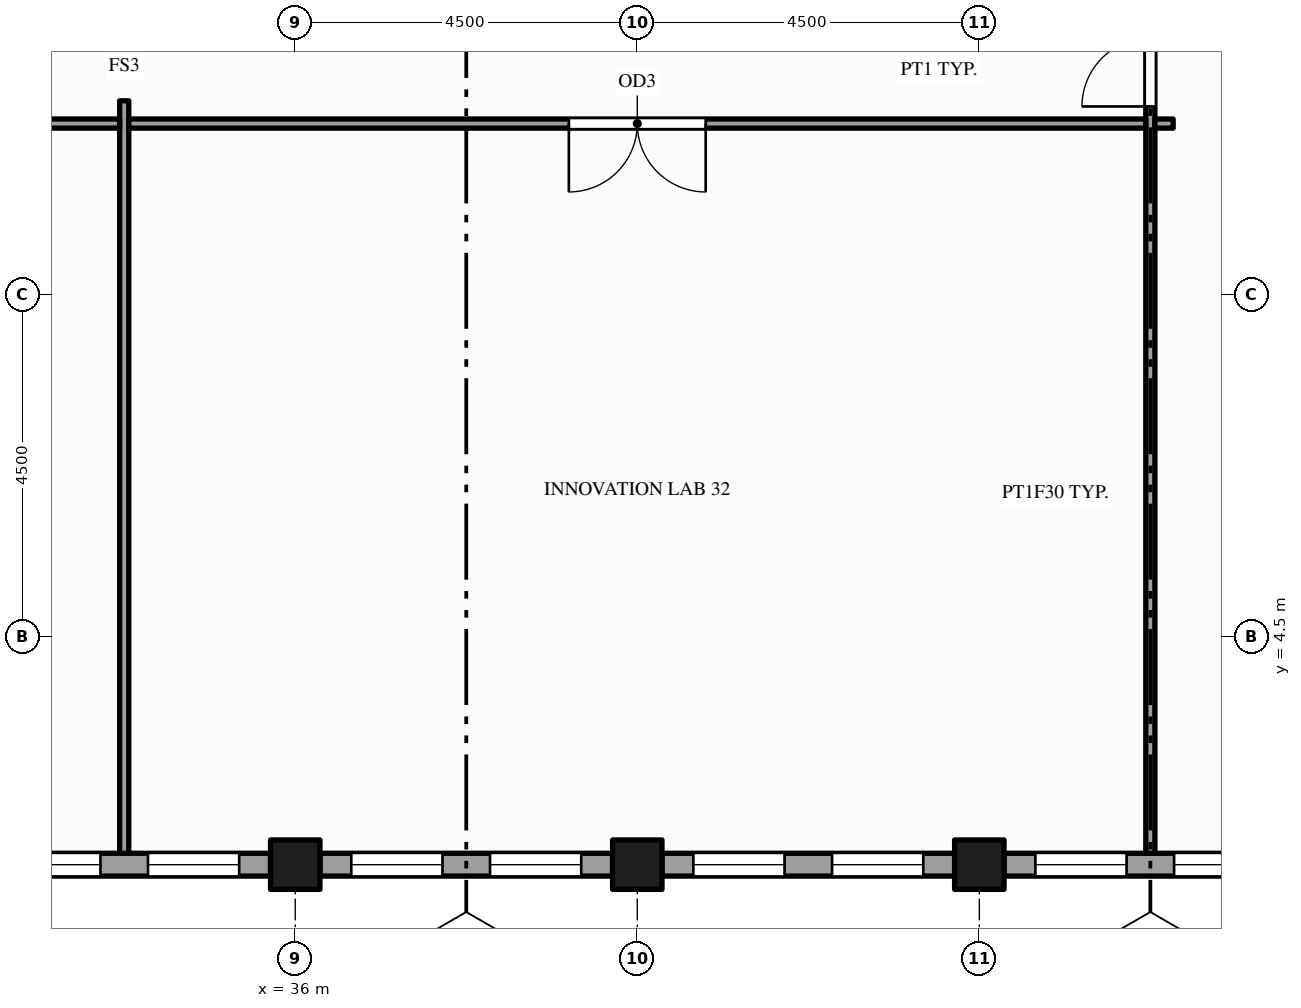
"""IFC4 building model, lengths in metres.
Left out: names, types, materials, properties, quantities, classifications, styles, units other than length and angle.
Written with IfcOpenShell. Run it as: python <this file> out.ifc"""

import sys

from ifc_helpers import new_model, si_unit, direction, frame, frame_2d, origin, origin_2d, place, context, subcontext, project, spatial, rectangle, hollow_rectangle, extrude, element, fill, save


model = new_model("IFC4")
c1 = context("Model", 3, precision=1e-05, world=origin(), true_north=direction((0.0, 1.0)))
c2 = subcontext(c1, "Body", "Model", "MODEL_VIEW")
j1 = project(units=[si_unit("LENGTHUNIT", "METRE"), si_unit("PLANEANGLEUNIT", "RADIAN")], contexts=[c1])
p1 = place(None, origin())
s1 = spatial("IfcSite", under=j1, at=p1, CompositionType="ELEMENT")
p2 = place(p1, origin())
s2 = spatial("IfcBuilding", under=s1, at=p2, CompositionType="ELEMENT")
p3 = place(p2, frame((0.0, 0.0, 261.0)))
s3 = spatial("IfcBuildingStorey", under=s2, at=p3, CompositionType="ELEMENT", Elevation=261.0)
for number, where, z_axis, x_axis in (
    (1, (36.0, 1.5, -0.15), (0.0, 0.0, 1.0), (1.0, 0.0, 0.0)),
    (2, (40.5, 1.5, -0.15), (0.0, 0.0, 1.0), (1.0, 0.0, 0.0)),
    (3, (45.0, 1.5, -0.15), (0.0, 0.0, 1.0), (1.0, 0.0, 0.0)),
):
    element("IfcColumn", number, at=place(p3, frame(where, z_axis=z_axis, x_axis=x_axis)), inside=s3, PredefinedType="COLUMN", context=c2, shape_type="SweptSolid", body=[
        extrude(hollow_rectangle(XDim=0.65, YDim=0.65, WallThickness=0.032, at=origin_2d()), origin(), (0.0, 0.0, 1.0), 4.0),
    ])
p4 = place(p3, frame((31.825, 1.5, 0.0), z_axis=(0.0, 0.0, 1.0), x_axis=(1.0, 0.0, 0.0)))
e4 = element("IfcWall", 4, at=p4, inside=s3, PredefinedType="STANDARD", context=c2, shape_type="SweptSolid", body=[
    extrude(rectangle(XDim=3.85, YDim=0.3, at=frame_2d((1.925, 0.0))), origin(), (0.0, 0.0, 1.0), 2.87),
])
p5 = place(p4, frame((0.413, 0.0, 0.9)))
e5 = element("IfcOpeningElement", 5, at=p5, cuts=e4, PredefinedType="OPENING", context=c2, shape_type="SweptSolid", body=[
    extrude(rectangle(XDim=1.2, YDim=1.75, at=frame_2d((0.6, 0.875))), frame((0.0, 0.16, 0.0), z_axis=(0.0, -1.0, 0.0), x_axis=(1.0, 0.0, 0.0)), (0.0, 0.0, 1.0), 0.32),
])
p6 = place(p4, frame((2.238, 0.0, 0.9)))
e6 = element("IfcOpeningElement", 6, at=p6, cuts=e4, PredefinedType="OPENING", context=c2, shape_type="SweptSolid", body=[
    extrude(rectangle(XDim=1.2, YDim=1.75, at=frame_2d((0.6, 0.875))), frame((0.0, 0.16, 0.0), z_axis=(0.0, -1.0, 0.0), x_axis=(1.0, 0.0, 0.0)), (0.0, 0.0, 1.0), 0.32),
])
p7 = place(p3, frame((36.325, 1.5, 0.0), z_axis=(0.0, 0.0, 1.0), x_axis=(1.0, 0.0, 0.0)))
e7 = element("IfcWall", 7, at=p7, inside=s3, PredefinedType="STANDARD", context=c2, shape_type="SweptSolid", body=[
    extrude(rectangle(XDim=3.85, YDim=0.3, at=frame_2d((1.925, 0.0))), origin(), (0.0, 0.0, 1.0), 2.87),
])
p8 = place(p7, frame((0.413, 0.0, 0.9)))
e8 = element("IfcOpeningElement", 8, at=p8, cuts=e7, PredefinedType="OPENING", context=c2, shape_type="SweptSolid", body=[
    extrude(rectangle(XDim=1.2, YDim=1.75, at=frame_2d((0.6, 0.875))), frame((0.0, 0.16, 0.0), z_axis=(0.0, -1.0, 0.0), x_axis=(1.0, 0.0, 0.0)), (0.0, 0.0, 1.0), 0.32),
])
p9 = place(p7, frame((2.238, 0.0, 0.9)))
e9 = element("IfcOpeningElement", 9, at=p9, cuts=e7, PredefinedType="OPENING", context=c2, shape_type="SweptSolid", body=[
    extrude(rectangle(XDim=1.2, YDim=1.75, at=frame_2d((0.6, 0.875))), frame((0.0, 0.16, 0.0), z_axis=(0.0, -1.0, 0.0), x_axis=(1.0, 0.0, 0.0)), (0.0, 0.0, 1.0), 0.32),
])
p10 = place(p3, frame((40.825, 1.5, 0.0), z_axis=(0.0, 0.0, 1.0), x_axis=(1.0, 0.0, 0.0)))
e10 = element("IfcWall", 10, at=p10, inside=s3, PredefinedType="STANDARD", context=c2, shape_type="SweptSolid", body=[
    extrude(rectangle(XDim=3.85, YDim=0.3, at=frame_2d((1.925, 0.0))), origin(), (0.0, 0.0, 1.0), 2.87),
])
p11 = place(p10, frame((0.413, 0.0, 0.9)))
e11 = element("IfcOpeningElement", 11, at=p11, cuts=e10, PredefinedType="OPENING", context=c2, shape_type="SweptSolid", body=[
    extrude(rectangle(XDim=1.2, YDim=1.75, at=frame_2d((0.6, 0.875))), frame((0.0, 0.16, 0.0), z_axis=(0.0, -1.0, 0.0), x_axis=(1.0, 0.0, 0.0)), (0.0, 0.0, 1.0), 0.32),
])
p12 = place(p10, frame((2.238, 0.0, 0.9)))
e12 = element("IfcOpeningElement", 12, at=p12, cuts=e10, PredefinedType="OPENING", context=c2, shape_type="SweptSolid", body=[
    extrude(rectangle(XDim=1.2, YDim=1.75, at=frame_2d((0.6, 0.875))), frame((0.0, 0.16, 0.0), z_axis=(0.0, -1.0, 0.0), x_axis=(1.0, 0.0, 0.0)), (0.0, 0.0, 1.0), 0.32),
])
p13 = place(p3, frame((45.325, 1.5, 0.0), z_axis=(0.0, 0.0, 1.0), x_axis=(1.0, 0.0, 0.0)))
e13 = element("IfcWall", 13, at=p13, inside=s3, PredefinedType="STANDARD", context=c2, shape_type="SweptSolid", body=[
    extrude(rectangle(XDim=3.85, YDim=0.3, at=frame_2d((1.925, 0.0))), origin(), (0.0, 0.0, 1.0), 2.87),
])
p14 = place(p13, frame((0.413, 0.0, 0.9)))
e14 = element("IfcOpeningElement", 14, at=p14, cuts=e13, PredefinedType="OPENING", context=c2, shape_type="SweptSolid", body=[
    extrude(rectangle(XDim=1.2, YDim=1.75, at=frame_2d((0.6, 0.875))), frame((0.0, 0.16, 0.0), z_axis=(0.0, -1.0, 0.0), x_axis=(1.0, 0.0, 0.0)), (0.0, 0.0, 1.0), 0.32),
])
p15 = place(p13, frame((2.238, 0.0, 0.9)))
e15 = element("IfcOpeningElement", 15, at=p15, cuts=e13, PredefinedType="OPENING", context=c2, shape_type="SweptSolid", body=[
    extrude(rectangle(XDim=1.2, YDim=1.75, at=frame_2d((0.6, 0.875))), frame((0.0, 0.16, 0.0), z_axis=(0.0, -1.0, 0.0), x_axis=(1.0, 0.0, 0.0)), (0.0, 0.0, 1.0), 0.32),
])
p16 = place(p3, frame((33.75, 1.65, 0.0), z_axis=(0.0, 0.0, 1.0), x_axis=(0.0, 1.0, 0.0)))
e16 = element("IfcWall", 16, at=p16, inside=s3, PredefinedType="PARTITIONING", context=c2, shape_type="SweptSolid", body=[
    extrude(rectangle(XDim=9.9, YDim=0.12, at=frame_2d((4.95, 0.0))), origin(), (0.0, 0.0, 1.0), 2.87),
])
p17 = place(p3, frame((47.25, 1.65, 0.0), z_axis=(0.0, 0.0, 1.0), x_axis=(0.0, 1.0, 0.0)))
e17 = element("IfcWall", 17, at=p17, inside=s3, PredefinedType="PARTITIONING", context=c2, shape_type="SweptSolid", body=[
    extrude(rectangle(XDim=22.2, YDim=0.12, at=frame_2d((11.1, 0.0))), origin(), (0.0, 0.0, 1.0), 2.87),
])
p18 = place(p17, frame((9.825, 0.0, 0.0)))
e18 = element("IfcOpeningElement", 18, at=p18, cuts=e17, PredefinedType="OPENING", context=c2, shape_type="SweptSolid", body=[
    extrude(rectangle(XDim=1.8, YDim=2.1, at=frame_2d((0.9, 1.05))), frame((0.0, 0.07, 0.0), z_axis=(0.0, -1.0, 0.0), x_axis=(1.0, 0.0, 0.0)), (0.0, 0.0, 1.0), 0.14),
])
p19 = place(p17, frame((12.85, 0.0, 0.0)))
e19 = element("IfcOpeningElement", 19, at=p19, cuts=e17, PredefinedType="OPENING", context=c2, shape_type="SweptSolid", body=[
    extrude(rectangle(XDim=0.9, YDim=2.1, at=frame_2d((0.45, 1.05))), frame((0.0, 0.07, 0.0), z_axis=(0.0, -1.0, 0.0), x_axis=(1.0, 0.0, 0.0)), (0.0, 0.0, 1.0), 0.14),
])
p20 = place(p17, frame((16.65, 0.0, 0.0)))
e20 = element("IfcOpeningElement", 20, at=p20, cuts=e17, PredefinedType="OPENING", context=c2, shape_type="SweptSolid", body=[
    extrude(rectangle(XDim=0.9, YDim=2.1, at=frame_2d((0.45, 1.05))), frame((0.0, 0.07, 0.0), z_axis=(0.0, -1.0, 0.0), x_axis=(1.0, 0.0, 0.0)), (0.0, 0.0, 1.0), 0.14),
])
p21 = place(p17, frame((20.35, 0.0, 0.0)))
e21 = element("IfcOpeningElement", 21, at=p21, cuts=e17, PredefinedType="OPENING", context=c2, shape_type="SweptSolid", body=[
    extrude(rectangle(XDim=1.0, YDim=2.1, at=frame_2d((0.5, 1.05))), frame((0.0, 0.07, 0.0), z_axis=(0.0, -1.0, 0.0), x_axis=(1.0, 0.0, 0.0)), (0.0, 0.0, 1.0), 0.14),
])
p22 = place(p3, frame((29.31, 11.25, 0.0), z_axis=(0.0, 0.0, 1.0), x_axis=(1.0, 0.0, 0.0)))
e22 = element("IfcWall", 22, at=p22, inside=s3, PredefinedType="PARTITIONING", context=c2, shape_type="SweptSolid", body=[
    extrude(rectangle(XDim=4.38, YDim=0.12, at=frame_2d((2.19, 0.0))), origin(), (0.0, 0.0, 1.0), 2.87),
])
p23 = place(p22, frame((1.69, 0.0, 0.0)))
e23 = element("IfcOpeningElement", 23, at=p23, cuts=e22, PredefinedType="OPENING", context=c2, shape_type="SweptSolid", body=[
    extrude(rectangle(XDim=1.0, YDim=2.1, at=frame_2d((0.5, 1.05))), frame((0.0, 0.07, 0.0), z_axis=(0.0, -1.0, 0.0), x_axis=(1.0, 0.0, 0.0)), (0.0, 0.0, 1.0), 0.14),
])
p24 = place(p3, frame((33.81, 11.25, 0.0), z_axis=(0.0, 0.0, 1.0), x_axis=(1.0, 0.0, 0.0)))
e24 = element("IfcWall", 24, at=p24, inside=s3, PredefinedType="PARTITIONING", context=c2, shape_type="SweptSolid", body=[
    extrude(rectangle(XDim=13.38, YDim=0.12, at=frame_2d((6.69, 0.0))), origin(), (0.0, 0.0, 1.0), 2.87),
])
p25 = place(p24, frame((5.79, 0.0, 0.0)))
e25 = element("IfcOpeningElement", 25, at=p25, cuts=e24, PredefinedType="OPENING", context=c2, shape_type="SweptSolid", body=[
    extrude(rectangle(XDim=1.8, YDim=2.1, at=frame_2d((0.9, 1.05))), frame((0.0, 0.07, 0.0), z_axis=(0.0, -1.0, 0.0), x_axis=(1.0, 0.0, 0.0)), (0.0, 0.0, 1.0), 0.14),
])
p26 = place(p3, frame((47.31, 11.25, 0.0), z_axis=(0.0, 0.0, 1.0), x_axis=(1.0, 0.0, 0.0)))
e26 = element("IfcWall", 26, at=p26, inside=s3, PredefinedType="PARTITIONING", context=c2, shape_type="SweptSolid", body=[
    extrude(rectangle(XDim=0.24, YDim=0.12, at=frame_2d((0.12, 0.0))), origin(), (0.0, 0.0, 1.0), 2.87),
])
p27 = place(p5, origin())
e27 = element("IfcWindow", 27, at=p27, inside=s3, PartitioningType="SINGLE_PANEL", PredefinedType="WINDOW", context=c2, shape_type="SweptSolid", body=[
    extrude(rectangle(XDim=1.2, YDim=1.75, at=frame_2d((0.6, 0.875))), frame((0.0, 0.03, 0.0), z_axis=(0.0, -1.0, 0.0), x_axis=(1.0, 0.0, 0.0)), (0.0, 0.0, 1.0), 0.06),
])
fill(e5, e27)
p28 = place(p6, origin())
e28 = element("IfcWindow", 28, at=p28, inside=s3, PartitioningType="SINGLE_PANEL", PredefinedType="WINDOW", context=c2, shape_type="SweptSolid", body=[
    extrude(rectangle(XDim=1.2, YDim=1.75, at=frame_2d((0.6, 0.875))), frame((0.0, 0.03, 0.0), z_axis=(0.0, -1.0, 0.0), x_axis=(1.0, 0.0, 0.0)), (0.0, 0.0, 1.0), 0.06),
])
fill(e6, e28)
p29 = place(p8, origin())
e29 = element("IfcWindow", 29, at=p29, inside=s3, PartitioningType="SINGLE_PANEL", PredefinedType="WINDOW", context=c2, shape_type="SweptSolid", body=[
    extrude(rectangle(XDim=1.2, YDim=1.75, at=frame_2d((0.6, 0.875))), frame((0.0, 0.03, 0.0), z_axis=(0.0, -1.0, 0.0), x_axis=(1.0, 0.0, 0.0)), (0.0, 0.0, 1.0), 0.06),
])
fill(e8, e29)
p30 = place(p9, origin())
e30 = element("IfcWindow", 30, at=p30, inside=s3, PartitioningType="SINGLE_PANEL", PredefinedType="WINDOW", context=c2, shape_type="SweptSolid", body=[
    extrude(rectangle(XDim=1.2, YDim=1.75, at=frame_2d((0.6, 0.875))), frame((0.0, 0.03, 0.0), z_axis=(0.0, -1.0, 0.0), x_axis=(1.0, 0.0, 0.0)), (0.0, 0.0, 1.0), 0.06),
])
fill(e9, e30)
p31 = place(p11, origin())
e31 = element("IfcWindow", 31, at=p31, inside=s3, PartitioningType="SINGLE_PANEL", PredefinedType="WINDOW", context=c2, shape_type="SweptSolid", body=[
    extrude(rectangle(XDim=1.2, YDim=1.75, at=frame_2d((0.6, 0.875))), frame((0.0, 0.03, 0.0), z_axis=(0.0, -1.0, 0.0), x_axis=(1.0, 0.0, 0.0)), (0.0, 0.0, 1.0), 0.06),
])
fill(e11, e31)
p32 = place(p12, origin())
e32 = element("IfcWindow", 32, at=p32, inside=s3, PartitioningType="SINGLE_PANEL", PredefinedType="WINDOW", context=c2, shape_type="SweptSolid", body=[
    extrude(rectangle(XDim=1.2, YDim=1.75, at=frame_2d((0.6, 0.875))), frame((0.0, 0.03, 0.0), z_axis=(0.0, -1.0, 0.0), x_axis=(1.0, 0.0, 0.0)), (0.0, 0.0, 1.0), 0.06),
])
fill(e12, e32)
p33 = place(p14, origin())
e33 = element("IfcWindow", 33, at=p33, inside=s3, PartitioningType="SINGLE_PANEL", PredefinedType="WINDOW", context=c2, shape_type="SweptSolid", body=[
    extrude(rectangle(XDim=1.2, YDim=1.75, at=frame_2d((0.6, 0.875))), frame((0.0, 0.03, 0.0), z_axis=(0.0, -1.0, 0.0), x_axis=(1.0, 0.0, 0.0)), (0.0, 0.0, 1.0), 0.06),
])
fill(e14, e33)
p34 = place(p15, origin())
e34 = element("IfcWindow", 34, at=p34, inside=s3, PartitioningType="SINGLE_PANEL", PredefinedType="WINDOW", context=c2, shape_type="SweptSolid", body=[
    extrude(rectangle(XDim=1.2, YDim=1.75, at=frame_2d((0.6, 0.875))), frame((0.0, 0.03, 0.0), z_axis=(0.0, -1.0, 0.0), x_axis=(1.0, 0.0, 0.0)), (0.0, 0.0, 1.0), 0.06),
])
fill(e15, e34)
p35 = place(p18, origin())
e35 = element("IfcDoor", 35, at=p35, inside=s3, OperationType="DOUBLE_DOOR_SINGLE_SWING", PredefinedType="DOOR", context=c2, shape_type="SweptSolid", body=[
    extrude(rectangle(XDim=1.8, YDim=2.1, at=frame_2d((0.9, 1.05))), frame((0.0, 0.025, 0.0), z_axis=(0.0, -1.0, 0.0), x_axis=(1.0, 0.0, 0.0)), (0.0, 0.0, 1.0), 0.05),
])
fill(e18, e35)
p36 = place(p25, origin())
e36 = element("IfcDoor", 36, at=p36, inside=s3, OperationType="DOUBLE_DOOR_SINGLE_SWING", PredefinedType="DOOR", context=c2, shape_type="SweptSolid", body=[
    extrude(rectangle(XDim=1.8, YDim=2.1, at=frame_2d((0.9, 1.05))), frame((0.0, 0.025, 0.0), z_axis=(0.0, -1.0, 0.0), x_axis=(1.0, 0.0, 0.0)), (0.0, 0.0, 1.0), 0.05),
])
fill(e25, e36)
save(model, sys.argv[1])
